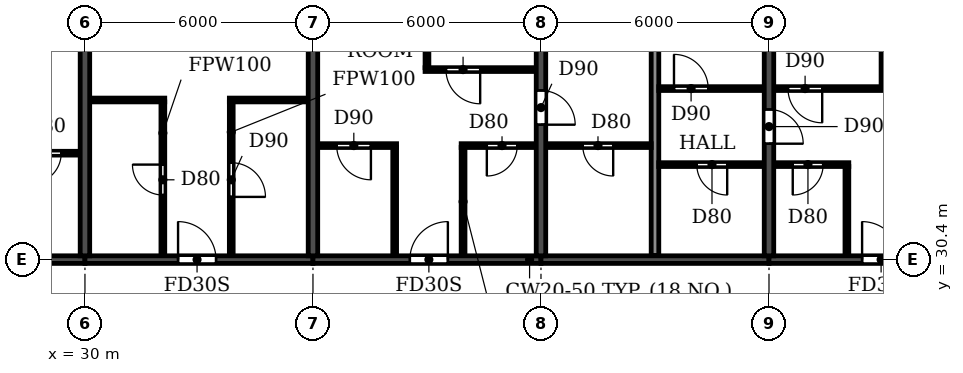
"""IFC4 building model, lengths in metres.
Left out: names, types, materials, properties, quantities, classifications, styles, units other than length and angle.
Written with IfcOpenShell. Run it as: python <this file> out.ifc"""

import sys

from ifc_helpers import new_model, si_unit, direction, frame, frame_2d, origin, place, context, subcontext, project, spatial, rectangle, extrude, element, fill, save


model = new_model("IFC4")
c1 = context("Model", 3, precision=1e-05, world=origin(), true_north=direction((0.0, 1.0)))
c2 = subcontext(c1, "Body", "Model", "MODEL_VIEW")
j1 = project(units=[si_unit("LENGTHUNIT", "METRE"), si_unit("PLANEANGLEUNIT", "RADIAN")], contexts=[c1])
p1 = place(None, origin())
s1 = spatial("IfcSite", under=j1, at=p1, CompositionType="ELEMENT")
p2 = place(p1, origin())
s2 = spatial("IfcBuilding", under=s1, at=p2, CompositionType="ELEMENT")
p3 = place(p2, frame((0.0, 0.0, 208.2)))
s3 = spatial("IfcBuildingStorey", under=s2, at=p3, CompositionType="ELEMENT", Elevation=208.2)
for number, where, z_axis, x_axis in (
    (1, (30.0, 30.5, 0.0), (0.0, 0.0, 1.0), (0.0, 1.0, 0.0)),
    (2, (36.0, 30.5, 0.0), (0.0, 0.0, 1.0), (0.0, 1.0, 0.0)),
):
    element("IfcWall", number, at=place(p3, frame(where, z_axis=z_axis, x_axis=x_axis)), inside=s3, PredefinedType="SHEAR", context=c2, shape_type="SweptSolid", body=[
        extrude(rectangle(XDim=10.5, YDim=0.25, at=frame_2d((5.25, 0.0))), origin(), (0.0, 0.0, 1.0), 3.0),
    ])
p4 = place(p3, frame((42.0, 30.5, 0.0), z_axis=(0.0, 0.0, 1.0), x_axis=(0.0, 1.0, 0.0)))
e3 = element("IfcWall", 3, at=p4, inside=s3, PredefinedType="SHEAR", context=c2, shape_type="SweptSolid", body=[
    extrude(rectangle(XDim=10.5, YDim=0.25, at=frame_2d((5.25, 0.0))), origin(), (0.0, 0.0, 1.0), 3.0),
])
p5 = place(p4, frame((3.45, 0.0, 0.0)))
e4 = element("IfcOpeningElement", 4, at=p5, cuts=e3, PredefinedType="OPENING", context=c2, shape_type="SweptSolid", body=[
    extrude(rectangle(XDim=0.9, YDim=2.1, at=frame_2d((0.45, 1.05))), frame((0.0, 0.135, 0.0), z_axis=(0.0, -1.0, 0.0), x_axis=(1.0, 0.0, 0.0)), (0.0, 0.0, 1.0), 0.27),
])
p6 = place(p3, frame((48.0, 30.5, 0.0), z_axis=(0.0, 0.0, 1.0), x_axis=(0.0, 1.0, 0.0)))
e5 = element("IfcWall", 5, at=p6, inside=s3, PredefinedType="SHEAR", context=c2, shape_type="SweptSolid", body=[
    extrude(rectangle(XDim=10.5, YDim=0.25, at=frame_2d((5.25, 0.0))), origin(), (0.0, 0.0, 1.0), 3.0),
])
p7 = place(p6, frame((2.95, 0.0, 0.0)))
e6 = element("IfcOpeningElement", 6, at=p7, cuts=e5, PredefinedType="OPENING", context=c2, shape_type="SweptSolid", body=[
    extrude(rectangle(XDim=0.9, YDim=2.1, at=frame_2d((0.45, 1.05))), frame((0.0, 0.135, 0.0), z_axis=(0.0, -1.0, 0.0), x_axis=(1.0, 0.0, 0.0)), (0.0, 0.0, 1.0), 0.27),
])
p8 = place(p3, frame((24.0, 30.4, 0.0), z_axis=(0.0, 0.0, 1.0), x_axis=(1.0, 0.0, 0.0)))
e7 = element("IfcWall", 7, at=p8, inside=s3, PredefinedType="SHEAR", context=c2, shape_type="SweptSolid", body=[
    extrude(rectangle(XDim=6.0, YDim=0.2, at=frame_2d((3.0, 0.0))), origin(), (0.0, 0.0, 1.0), 2.4),
])
p9 = place(p8, frame((2.55, 0.0, 0.0)))
e8 = element("IfcOpeningElement", 8, at=p9, cuts=e7, PredefinedType="OPENING", context=c2, shape_type="SweptSolid", body=[
    extrude(rectangle(XDim=1.0, YDim=2.1, at=frame_2d((0.5, 1.05))), frame((0.0, 0.11, 0.0), z_axis=(0.0, -1.0, 0.0), x_axis=(1.0, 0.0, 0.0)), (0.0, 0.0, 1.0), 0.22),
])
p10 = place(p3, frame((30.0, 30.4, 0.0), z_axis=(0.0, 0.0, 1.0), x_axis=(1.0, 0.0, 0.0)))
e9 = element("IfcWall", 9, at=p10, inside=s3, PredefinedType="SHEAR", context=c2, shape_type="SweptSolid", body=[
    extrude(rectangle(XDim=6.0, YDim=0.2, at=frame_2d((3.0, 0.0))), origin(), (0.0, 0.0, 1.0), 2.4),
])
p11 = place(p10, frame((2.45, 0.0, 0.0)))
e10 = element("IfcOpeningElement", 10, at=p11, cuts=e9, PredefinedType="OPENING", context=c2, shape_type="SweptSolid", body=[
    extrude(rectangle(XDim=1.0, YDim=2.1, at=frame_2d((0.5, 1.05))), frame((0.0, 0.11, 0.0), z_axis=(0.0, -1.0, 0.0), x_axis=(1.0, 0.0, 0.0)), (0.0, 0.0, 1.0), 0.22),
])
p12 = place(p3, frame((36.0, 30.4, 0.0), z_axis=(0.0, 0.0, 1.0), x_axis=(1.0, 0.0, 0.0)))
e11 = element("IfcWall", 11, at=p12, inside=s3, PredefinedType="SHEAR", context=c2, shape_type="SweptSolid", body=[
    extrude(rectangle(XDim=6.0, YDim=0.2, at=frame_2d((3.0, 0.0))), origin(), (0.0, 0.0, 1.0), 2.4),
])
p13 = place(p12, frame((2.55, 0.0, 0.0)))
e12 = element("IfcOpeningElement", 12, at=p13, cuts=e11, PredefinedType="OPENING", context=c2, shape_type="SweptSolid", body=[
    extrude(rectangle(XDim=1.0, YDim=2.1, at=frame_2d((0.5, 1.05))), frame((0.0, 0.11, 0.0), z_axis=(0.0, -1.0, 0.0), x_axis=(1.0, 0.0, 0.0)), (0.0, 0.0, 1.0), 0.22),
])
p14 = place(p3, frame((42.0, 30.4, 0.0), z_axis=(0.0, 0.0, 1.0), x_axis=(1.0, 0.0, 0.0)))
e13 = element("IfcWall", 13, at=p14, inside=s3, PredefinedType="SHEAR", context=c2, shape_type="SweptSolid", body=[
    extrude(rectangle(XDim=6.0, YDim=0.2, at=frame_2d((3.0, 0.0))), origin(), (0.0, 0.0, 1.0), 2.4),
])
p15 = place(p3, frame((48.0, 30.4, 0.0), z_axis=(0.0, 0.0, 1.0), x_axis=(1.0, 0.0, 0.0)))
e14 = element("IfcWall", 14, at=p15, inside=s3, PredefinedType="SHEAR", context=c2, shape_type="SweptSolid", body=[
    extrude(rectangle(XDim=6.0, YDim=0.2, at=frame_2d((3.0, 0.0))), origin(), (0.0, 0.0, 1.0), 2.4),
])
p16 = place(p15, frame((2.45, 0.0, 0.0)))
e15 = element("IfcOpeningElement", 15, at=p16, cuts=e14, PredefinedType="OPENING", context=c2, shape_type="SweptSolid", body=[
    extrude(rectangle(XDim=1.0, YDim=2.1, at=frame_2d((0.5, 1.05))), frame((0.0, 0.11, 0.0), z_axis=(0.0, -1.0, 0.0), x_axis=(1.0, 0.0, 0.0)), (0.0, 0.0, 1.0), 0.22),
])
p17 = place(p3, frame((45.0, 30.51, 0.0), z_axis=(0.0, 0.0, 1.0), x_axis=(0.0, 1.0, 0.0)))
e16 = element("IfcWall", 16, at=p17, inside=s3, PredefinedType="PARTITIONING", context=c2, shape_type="SweptSolid", body=[
    extrude(rectangle(XDim=10.63, YDim=0.2, at=frame_2d((5.315, 0.0))), origin(), (0.0, 0.0, 1.0), 3.0),
])
p18 = place(p3, frame((45.1, 32.9, 0.0), z_axis=(0.0, 0.0, 1.0), x_axis=(1.0, 0.0, 0.0)))
e17 = element("IfcWall", 17, at=p18, inside=s3, PredefinedType="PARTITIONING", context=c2, shape_type="SweptSolid", body=[
    extrude(rectangle(XDim=2.765, YDim=0.1, at=frame_2d((1.382, 0.0))), origin(), (0.0, 0.0, 1.0), 3.0),
])
p19 = place(p18, frame((1.0, 0.0, 0.0)))
e18 = element("IfcOpeningElement", 18, at=p19, cuts=e17, PredefinedType="OPENING", context=c2, shape_type="SweptSolid", body=[
    extrude(rectangle(XDim=0.8, YDim=2.1, at=frame_2d((0.4, 1.05))), frame((0.0, 0.06, 0.0), z_axis=(0.0, -1.0, 0.0), x_axis=(1.0, 0.0, 0.0)), (0.0, 0.0, 1.0), 0.12),
])
p20 = place(p3, frame((48.135, 32.9, 0.0), z_axis=(0.0, 0.0, 1.0), x_axis=(1.0, 0.0, 0.0)))
e19 = element("IfcWall", 19, at=p20, inside=s3, PredefinedType="PARTITIONING", context=c2, shape_type="SweptSolid", body=[
    extrude(rectangle(XDim=1.965, YDim=0.1, at=frame_2d((0.982, 0.0))), origin(), (0.0, 0.0, 1.0), 3.0),
])
p21 = place(p20, frame((0.49, 0.0, 0.0)))
e20 = element("IfcOpeningElement", 20, at=p21, cuts=e19, PredefinedType="OPENING", context=c2, shape_type="SweptSolid", body=[
    extrude(rectangle(XDim=0.8, YDim=2.1, at=frame_2d((0.4, 1.05))), frame((0.0, 0.06, 0.0), z_axis=(0.0, -1.0, 0.0), x_axis=(1.0, 0.0, 0.0)), (0.0, 0.0, 1.0), 0.12),
])
p22 = place(p3, frame((27.9, 33.2, 0.0), z_axis=(0.0, 0.0, 1.0), x_axis=(1.0, 0.0, 0.0)))
e21 = element("IfcWall", 21, at=p22, inside=s3, PredefinedType="PARTITIONING", context=c2, shape_type="SweptSolid", body=[
    extrude(rectangle(XDim=1.965, YDim=0.1, at=frame_2d((0.982, 0.0))), origin(), (0.0, 0.0, 1.0), 3.0),
])
p23 = place(p22, frame((0.675, 0.0, 0.0)))
e22 = element("IfcOpeningElement", 22, at=p23, cuts=e21, PredefinedType="OPENING", context=c2, shape_type="SweptSolid", body=[
    extrude(rectangle(XDim=0.8, YDim=2.1, at=frame_2d((0.4, 1.05))), frame((0.0, 0.06, 0.0), z_axis=(0.0, -1.0, 0.0), x_axis=(1.0, 0.0, 0.0)), (0.0, 0.0, 1.0), 0.12),
])
p24 = place(p3, frame((36.135, 33.4, 0.0), z_axis=(0.0, 0.0, 1.0), x_axis=(1.0, 0.0, 0.0)))
e23 = element("IfcWall", 23, at=p24, inside=s3, PredefinedType="PARTITIONING", context=c2, shape_type="SweptSolid", body=[
    extrude(rectangle(XDim=2.065, YDim=0.1, at=frame_2d((1.032, 0.0))), origin(), (0.0, 0.0, 1.0), 3.0),
])
p25 = place(p24, frame((0.49, 0.0, 0.0)))
e24 = element("IfcOpeningElement", 24, at=p25, cuts=e23, PredefinedType="OPENING", context=c2, shape_type="SweptSolid", body=[
    extrude(rectangle(XDim=0.9, YDim=2.1, at=frame_2d((0.45, 1.05))), frame((0.0, 0.06, 0.0), z_axis=(0.0, -1.0, 0.0), x_axis=(1.0, 0.0, 0.0)), (0.0, 0.0, 1.0), 0.12),
])
p26 = place(p3, frame((39.9, 33.4, 0.0), z_axis=(0.0, 0.0, 1.0), x_axis=(1.0, 0.0, 0.0)))
e25 = element("IfcWall", 25, at=p26, inside=s3, PredefinedType="PARTITIONING", context=c2, shape_type="SweptSolid", body=[
    extrude(rectangle(XDim=1.965, YDim=0.1, at=frame_2d((0.982, 0.0))), origin(), (0.0, 0.0, 1.0), 3.0),
])
p27 = place(p26, frame((0.675, 0.0, 0.0)))
e26 = element("IfcOpeningElement", 26, at=p27, cuts=e25, PredefinedType="OPENING", context=c2, shape_type="SweptSolid", body=[
    extrude(rectangle(XDim=0.8, YDim=2.1, at=frame_2d((0.4, 1.05))), frame((0.0, 0.06, 0.0), z_axis=(0.0, -1.0, 0.0), x_axis=(1.0, 0.0, 0.0)), (0.0, 0.0, 1.0), 0.12),
])
p28 = place(p3, frame((42.135, 33.4, 0.0), z_axis=(0.0, 0.0, 1.0), x_axis=(1.0, 0.0, 0.0)))
e27 = element("IfcWall", 27, at=p28, inside=s3, PredefinedType="PARTITIONING", context=c2, shape_type="SweptSolid", body=[
    extrude(rectangle(XDim=2.765, YDim=0.1, at=frame_2d((1.382, 0.0))), origin(), (0.0, 0.0, 1.0), 3.0),
])
p29 = place(p28, frame((0.965, 0.0, 0.0)))
e28 = element("IfcOpeningElement", 28, at=p29, cuts=e27, PredefinedType="OPENING", context=c2, shape_type="SweptSolid", body=[
    extrude(rectangle(XDim=0.8, YDim=2.1, at=frame_2d((0.4, 1.05))), frame((0.0, 0.06, 0.0), z_axis=(0.0, -1.0, 0.0), x_axis=(1.0, 0.0, 0.0)), (0.0, 0.0, 1.0), 0.12),
])
p30 = place(p3, frame((30.135, 34.6, 0.0), z_axis=(0.0, 0.0, 1.0), x_axis=(1.0, 0.0, 0.0)))
e29 = element("IfcWall", 29, at=p30, inside=s3, PredefinedType="PARTITIONING", context=c2, shape_type="SweptSolid", body=[
    extrude(rectangle(XDim=1.965, YDim=0.1, at=frame_2d((0.982, 0.0))), origin(), (0.0, 0.0, 1.0), 3.0),
])
p31 = place(p3, frame((33.8, 34.6, 0.0), z_axis=(0.0, 0.0, 1.0), x_axis=(1.0, 0.0, 0.0)))
e30 = element("IfcWall", 30, at=p31, inside=s3, PredefinedType="PARTITIONING", context=c2, shape_type="SweptSolid", body=[
    extrude(rectangle(XDim=2.065, YDim=0.1, at=frame_2d((1.032, 0.0))), origin(), (0.0, 0.0, 1.0), 3.0),
])
p32 = place(p3, frame((45.1, 34.9, 0.0), z_axis=(0.0, 0.0, 1.0), x_axis=(1.0, 0.0, 0.0)))
e31 = element("IfcWall", 31, at=p32, inside=s3, PredefinedType="PARTITIONING", context=c2, shape_type="SweptSolid", body=[
    extrude(rectangle(XDim=2.765, YDim=0.1, at=frame_2d((1.382, 0.0))), origin(), (0.0, 0.0, 1.0), 3.0),
])
p33 = place(p32, frame((0.4, 0.0, 0.0)))
e32 = element("IfcOpeningElement", 32, at=p33, cuts=e31, PredefinedType="OPENING", context=c2, shape_type="SweptSolid", body=[
    extrude(rectangle(XDim=0.9, YDim=2.1, at=frame_2d((0.45, 1.05))), frame((0.0, 0.06, 0.0), z_axis=(0.0, -1.0, 0.0), x_axis=(1.0, 0.0, 0.0)), (0.0, 0.0, 1.0), 0.12),
])
p34 = place(p3, frame((48.135, 34.9, 0.0), z_axis=(0.0, 0.0, 1.0), x_axis=(1.0, 0.0, 0.0)))
e33 = element("IfcWall", 33, at=p34, inside=s3, PredefinedType="PARTITIONING", context=c2, shape_type="SweptSolid", body=[
    extrude(rectangle(XDim=2.915, YDim=0.1, at=frame_2d((1.458, 0.0))), origin(), (0.0, 0.0, 1.0), 3.0),
])
p35 = place(p34, frame((0.365, 0.0, 0.0)))
e34 = element("IfcOpeningElement", 34, at=p35, cuts=e33, PredefinedType="OPENING", context=c2, shape_type="SweptSolid", body=[
    extrude(rectangle(XDim=0.9, YDim=2.1, at=frame_2d((0.45, 1.05))), frame((0.0, 0.06, 0.0), z_axis=(0.0, -1.0, 0.0), x_axis=(1.0, 0.0, 0.0)), (0.0, 0.0, 1.0), 0.12),
])
p36 = place(p3, frame((38.95, 35.4, 0.0), z_axis=(0.0, 0.0, 1.0), x_axis=(1.0, 0.0, 0.0)))
e35 = element("IfcWall", 35, at=p36, inside=s3, PredefinedType="PARTITIONING", context=c2, shape_type="SweptSolid", body=[
    extrude(rectangle(XDim=2.915, YDim=0.1, at=frame_2d((1.458, 0.0))), origin(), (0.0, 0.0, 1.0), 3.0),
])
p37 = place(p36, frame((0.55, 0.0, 0.0)))
e36 = element("IfcOpeningElement", 36, at=p37, cuts=e35, PredefinedType="OPENING", context=c2, shape_type="SweptSolid", body=[
    extrude(rectangle(XDim=0.9, YDim=2.1, at=frame_2d((0.45, 1.05))), frame((0.0, 0.06, 0.0), z_axis=(0.0, -1.0, 0.0), x_axis=(1.0, 0.0, 0.0)), (0.0, 0.0, 1.0), 0.12),
])
p38 = place(p3, frame((32.05, 30.51, 0.0), z_axis=(0.0, 0.0, 1.0), x_axis=(0.0, 1.0, 0.0)))
e37 = element("IfcWall", 37, at=p38, inside=s3, PredefinedType="PARTITIONING", context=c2, shape_type="SweptSolid", body=[
    extrude(rectangle(XDim=4.04, YDim=0.1, at=frame_2d((2.02, 0.0))), origin(), (0.0, 0.0, 1.0), 3.0),
])
p39 = place(p38, frame((1.59, 0.0, 0.0)))
e38 = element("IfcOpeningElement", 38, at=p39, cuts=e37, PredefinedType="OPENING", context=c2, shape_type="SweptSolid", body=[
    extrude(rectangle(XDim=0.8, YDim=2.1, at=frame_2d((0.4, 1.05))), frame((0.0, 0.06, 0.0), z_axis=(0.0, -1.0, 0.0), x_axis=(1.0, 0.0, 0.0)), (0.0, 0.0, 1.0), 0.12),
])
p40 = place(p3, frame((33.85, 30.51, 0.0), z_axis=(0.0, 0.0, 1.0), x_axis=(0.0, 1.0, 0.0)))
e39 = element("IfcWall", 39, at=p40, inside=s3, PredefinedType="PARTITIONING", context=c2, shape_type="SweptSolid", body=[
    extrude(rectangle(XDim=4.04, YDim=0.1, at=frame_2d((2.02, 0.0))), origin(), (0.0, 0.0, 1.0), 3.0),
])
p41 = place(p40, frame((1.54, 0.0, 0.0)))
e40 = element("IfcOpeningElement", 40, at=p41, cuts=e39, PredefinedType="OPENING", context=c2, shape_type="SweptSolid", body=[
    extrude(rectangle(XDim=0.9, YDim=2.1, at=frame_2d((0.45, 1.05))), frame((0.0, 0.06, 0.0), z_axis=(0.0, -1.0, 0.0), x_axis=(1.0, 0.0, 0.0)), (0.0, 0.0, 1.0), 0.12),
])
p42 = place(p3, frame((38.15, 30.51, 0.0), z_axis=(0.0, 0.0, 1.0), x_axis=(0.0, 1.0, 0.0)))
e41 = element("IfcWall", 41, at=p42, inside=s3, PredefinedType="PARTITIONING", context=c2, shape_type="SweptSolid", body=[
    extrude(rectangle(XDim=2.84, YDim=0.1, at=frame_2d((1.42, 0.0))), origin(), (0.0, 0.0, 1.0), 3.0),
])
p43 = place(p3, frame((39.0, 35.45, 0.0), z_axis=(0.0, 0.0, 1.0), x_axis=(0.0, 1.0, 0.0)))
e42 = element("IfcWall", 42, at=p43, inside=s3, PredefinedType="PARTITIONING", context=c2, shape_type="SweptSolid", body=[
    extrude(rectangle(XDim=5.69, YDim=0.1, at=frame_2d((2.845, 0.0))), origin(), (0.0, 0.0, 1.0), 3.0),
])
p44 = place(p3, frame((39.95, 30.51, 0.0), z_axis=(0.0, 0.0, 1.0), x_axis=(0.0, 1.0, 0.0)))
e43 = element("IfcWall", 43, at=p44, inside=s3, PredefinedType="PARTITIONING", context=c2, shape_type="SweptSolid", body=[
    extrude(rectangle(XDim=2.84, YDim=0.1, at=frame_2d((1.42, 0.0))), origin(), (0.0, 0.0, 1.0), 3.0),
])
p45 = place(p3, frame((50.05, 30.51, 0.0), z_axis=(0.0, 0.0, 1.0), x_axis=(0.0, 1.0, 0.0)))
e44 = element("IfcWall", 44, at=p45, inside=s3, PredefinedType="PARTITIONING", context=c2, shape_type="SweptSolid", body=[
    extrude(rectangle(XDim=2.34, YDim=0.1, at=frame_2d((1.17, 0.0))), origin(), (0.0, 0.0, 1.0), 3.0),
])
p46 = place(p3, frame((51.0, 34.95, 0.0), z_axis=(0.0, 0.0, 1.0), x_axis=(0.0, 1.0, 0.0)))
e45 = element("IfcWall", 45, at=p46, inside=s3, PredefinedType="PARTITIONING", context=c2, shape_type="SweptSolid", body=[
    extrude(rectangle(XDim=6.19, YDim=0.1, at=frame_2d((3.095, 0.0))), origin(), (0.0, 0.0, 1.0), 3.0),
])
p47 = place(p23, frame((0.8, 0.0, 0.0), z_axis=(0.0, 0.0, 1.0), x_axis=(-1.0, 0.0, 0.0)))
e46 = element("IfcDoor", 46, at=p47, inside=s3, OperationType="SINGLE_SWING_RIGHT", PredefinedType="DOOR", context=c2, shape_type="SweptSolid", body=[
    extrude(rectangle(XDim=0.8, YDim=2.1, at=frame_2d((0.4, 1.05))), frame((0.0, 0.025, 0.0), z_axis=(0.0, -1.0, 0.0), x_axis=(1.0, 0.0, 0.0)), (0.0, 0.0, 1.0), 0.05),
])
fill(e22, e46)
p48 = place(p39, origin())
e47 = element("IfcDoor", 47, at=p48, inside=s3, OperationType="SINGLE_SWING_RIGHT", PredefinedType="DOOR", context=c2, shape_type="SweptSolid", body=[
    extrude(rectangle(XDim=0.8, YDim=2.1, at=frame_2d((0.4, 1.05))), frame((0.0, 0.025, 0.0), z_axis=(0.0, -1.0, 0.0), x_axis=(1.0, 0.0, 0.0)), (0.0, 0.0, 1.0), 0.05),
])
fill(e38, e47)
p49 = place(p11, origin())
e48 = element("IfcDoor", 48, at=p49, inside=s3, OperationType="SINGLE_SWING_LEFT", PredefinedType="DOOR", context=c2, shape_type="SweptSolid", body=[
    extrude(rectangle(XDim=1.0, YDim=2.1, at=frame_2d((0.5, 1.05))), frame((0.0, 0.025, 0.0), z_axis=(0.0, -1.0, 0.0), x_axis=(1.0, 0.0, 0.0)), (0.0, 0.0, 1.0), 0.05),
])
fill(e10, e48)
p50 = place(p41, frame((0.9, 0.0, 0.0), z_axis=(0.0, 0.0, 1.0), x_axis=(-1.0, 0.0, 0.0)))
e49 = element("IfcDoor", 49, at=p50, inside=s3, OperationType="SINGLE_SWING_RIGHT", PredefinedType="DOOR", context=c2, shape_type="SweptSolid", body=[
    extrude(rectangle(XDim=0.9, YDim=2.1, at=frame_2d((0.45, 1.05))), frame((0.0, 0.025, 0.0), z_axis=(0.0, -1.0, 0.0), x_axis=(1.0, 0.0, 0.0)), (0.0, 0.0, 1.0), 0.05),
])
fill(e40, e49)
p51 = place(p29, frame((0.8, 0.0, 0.0), z_axis=(0.0, 0.0, 1.0), x_axis=(-1.0, 0.0, 0.0)))
e50 = element("IfcDoor", 50, at=p51, inside=s3, OperationType="SINGLE_SWING_LEFT", PredefinedType="DOOR", context=c2, shape_type="SweptSolid", body=[
    extrude(rectangle(XDim=0.8, YDim=2.1, at=frame_2d((0.4, 1.05))), frame((0.0, 0.025, 0.0), z_axis=(0.0, -1.0, 0.0), x_axis=(1.0, 0.0, 0.0)), (0.0, 0.0, 1.0), 0.05),
])
fill(e28, e50)
p52 = place(p25, frame((0.9, 0.0, 0.0), z_axis=(0.0, 0.0, 1.0), x_axis=(-1.0, 0.0, 0.0)))
e51 = element("IfcDoor", 51, at=p52, inside=s3, OperationType="SINGLE_SWING_LEFT", PredefinedType="DOOR", context=c2, shape_type="SweptSolid", body=[
    extrude(rectangle(XDim=0.9, YDim=2.1, at=frame_2d((0.45, 1.05))), frame((0.0, 0.025, 0.0), z_axis=(0.0, -1.0, 0.0), x_axis=(1.0, 0.0, 0.0)), (0.0, 0.0, 1.0), 0.05),
])
fill(e24, e51)
p53 = place(p13, origin())
e52 = element("IfcDoor", 52, at=p53, inside=s3, OperationType="SINGLE_SWING_RIGHT", PredefinedType="DOOR", context=c2, shape_type="SweptSolid", body=[
    extrude(rectangle(XDim=1.0, YDim=2.1, at=frame_2d((0.5, 1.05))), frame((0.0, 0.025, 0.0), z_axis=(0.0, -1.0, 0.0), x_axis=(1.0, 0.0, 0.0)), (0.0, 0.0, 1.0), 0.05),
])
fill(e12, e52)
p54 = place(p37, frame((0.9, 0.0, 0.0), z_axis=(0.0, 0.0, 1.0), x_axis=(-1.0, 0.0, 0.0)))
e53 = element("IfcDoor", 53, at=p54, inside=s3, OperationType="SINGLE_SWING_LEFT", PredefinedType="DOOR", context=c2, shape_type="SweptSolid", body=[
    extrude(rectangle(XDim=0.9, YDim=2.1, at=frame_2d((0.45, 1.05))), frame((0.0, 0.025, 0.0), z_axis=(0.0, -1.0, 0.0), x_axis=(1.0, 0.0, 0.0)), (0.0, 0.0, 1.0), 0.05),
])
fill(e36, e53)
p55 = place(p27, frame((0.8, 0.0, 0.0), z_axis=(0.0, 0.0, 1.0), x_axis=(-1.0, 0.0, 0.0)))
e54 = element("IfcDoor", 54, at=p55, inside=s3, OperationType="SINGLE_SWING_RIGHT", PredefinedType="DOOR", context=c2, shape_type="SweptSolid", body=[
    extrude(rectangle(XDim=0.8, YDim=2.1, at=frame_2d((0.4, 1.05))), frame((0.0, 0.025, 0.0), z_axis=(0.0, -1.0, 0.0), x_axis=(1.0, 0.0, 0.0)), (0.0, 0.0, 1.0), 0.05),
])
fill(e26, e54)
p56 = place(p5, frame((0.9, 0.0, 0.0), z_axis=(0.0, 0.0, 1.0), x_axis=(-1.0, 0.0, 0.0)))
e55 = element("IfcDoor", 55, at=p56, inside=s3, OperationType="SINGLE_SWING_RIGHT", PredefinedType="DOOR", context=c2, shape_type="SweptSolid", body=[
    extrude(rectangle(XDim=0.9, YDim=2.1, at=frame_2d((0.45, 1.05))), frame((0.0, 0.025, 0.0), z_axis=(0.0, -1.0, 0.0), x_axis=(1.0, 0.0, 0.0)), (0.0, 0.0, 1.0), 0.05),
])
fill(e4, e55)
p57 = place(p33, origin())
e56 = element("IfcDoor", 56, at=p57, inside=s3, OperationType="SINGLE_SWING_LEFT", PredefinedType="DOOR", context=c2, shape_type="SweptSolid", body=[
    extrude(rectangle(XDim=0.9, YDim=2.1, at=frame_2d((0.45, 1.05))), frame((0.0, 0.025, 0.0), z_axis=(0.0, -1.0, 0.0), x_axis=(1.0, 0.0, 0.0)), (0.0, 0.0, 1.0), 0.05),
])
fill(e32, e56)
p58 = place(p19, frame((0.8, 0.0, 0.0), z_axis=(0.0, 0.0, 1.0), x_axis=(-1.0, 0.0, 0.0)))
e57 = element("IfcDoor", 57, at=p58, inside=s3, OperationType="SINGLE_SWING_LEFT", PredefinedType="DOOR", context=c2, shape_type="SweptSolid", body=[
    extrude(rectangle(XDim=0.8, YDim=2.1, at=frame_2d((0.4, 1.05))), frame((0.0, 0.025, 0.0), z_axis=(0.0, -1.0, 0.0), x_axis=(1.0, 0.0, 0.0)), (0.0, 0.0, 1.0), 0.05),
])
fill(e18, e57)
p59 = place(p7, frame((0.9, 0.0, 0.0), z_axis=(0.0, 0.0, 1.0), x_axis=(-1.0, 0.0, 0.0)))
e58 = element("IfcDoor", 58, at=p59, inside=s3, OperationType="SINGLE_SWING_RIGHT", PredefinedType="DOOR", context=c2, shape_type="SweptSolid", body=[
    extrude(rectangle(XDim=0.9, YDim=2.1, at=frame_2d((0.45, 1.05))), frame((0.0, 0.025, 0.0), z_axis=(0.0, -1.0, 0.0), x_axis=(1.0, 0.0, 0.0)), (0.0, 0.0, 1.0), 0.05),
])
fill(e6, e58)
p60 = place(p35, frame((0.9, 0.0, 0.0), z_axis=(0.0, 0.0, 1.0), x_axis=(-1.0, 0.0, 0.0)))
e59 = element("IfcDoor", 59, at=p60, inside=s3, OperationType="SINGLE_SWING_LEFT", PredefinedType="DOOR", context=c2, shape_type="SweptSolid", body=[
    extrude(rectangle(XDim=0.9, YDim=2.1, at=frame_2d((0.45, 1.05))), frame((0.0, 0.025, 0.0), z_axis=(0.0, -1.0, 0.0), x_axis=(1.0, 0.0, 0.0)), (0.0, 0.0, 1.0), 0.05),
])
fill(e34, e59)
p61 = place(p21, frame((0.8, 0.0, 0.0), z_axis=(0.0, 0.0, 1.0), x_axis=(-1.0, 0.0, 0.0)))
e60 = element("IfcDoor", 60, at=p61, inside=s3, OperationType="SINGLE_SWING_RIGHT", PredefinedType="DOOR", context=c2, shape_type="SweptSolid", body=[
    extrude(rectangle(XDim=0.8, YDim=2.1, at=frame_2d((0.4, 1.05))), frame((0.0, 0.025, 0.0), z_axis=(0.0, -1.0, 0.0), x_axis=(1.0, 0.0, 0.0)), (0.0, 0.0, 1.0), 0.05),
])
fill(e20, e60)
p62 = place(p16, origin())
e61 = element("IfcDoor", 61, at=p62, inside=s3, OperationType="SINGLE_SWING_LEFT", PredefinedType="DOOR", context=c2, shape_type="SweptSolid", body=[
    extrude(rectangle(XDim=1.0, YDim=2.1, at=frame_2d((0.5, 1.05))), frame((0.0, 0.025, 0.0), z_axis=(0.0, -1.0, 0.0), x_axis=(1.0, 0.0, 0.0)), (0.0, 0.0, 1.0), 0.05),
])
fill(e15, e61)
save(model, sys.argv[1])
